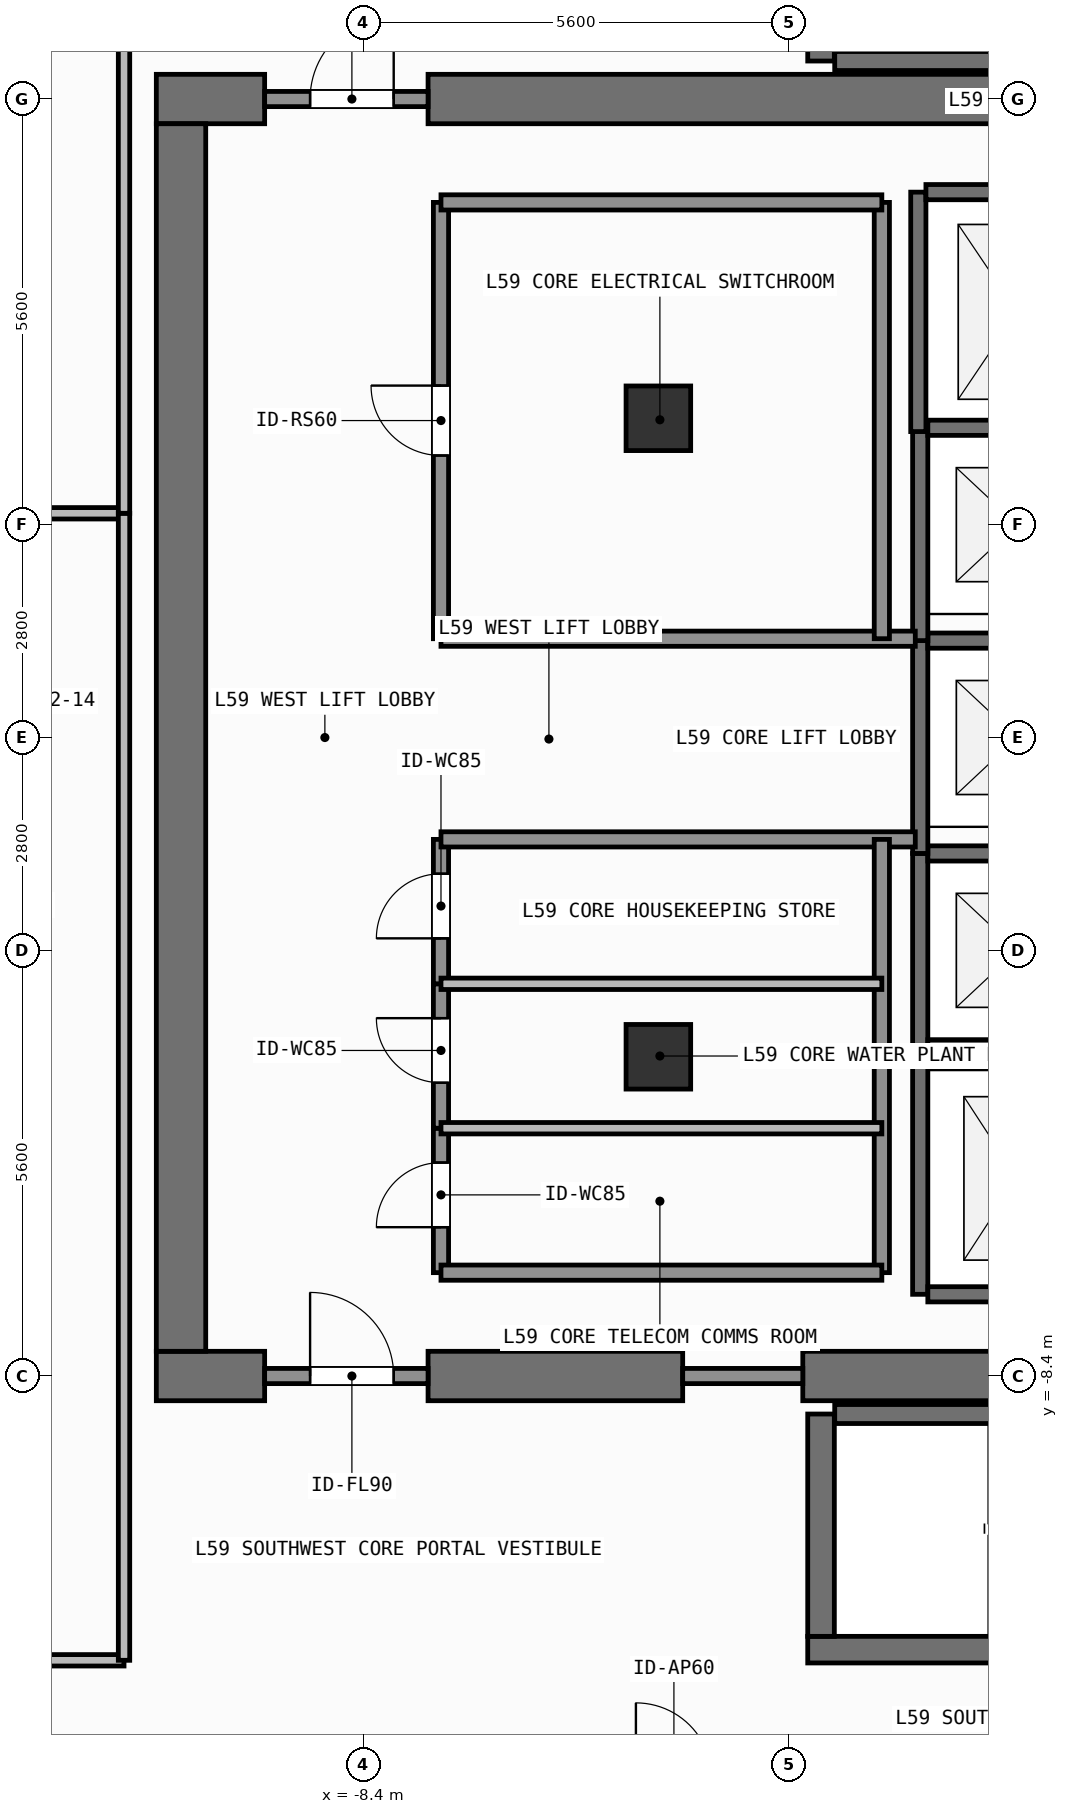
"""IFC4 building model, lengths in metres.
Left out: names, types, materials, properties, quantities, classifications, styles, units other than length and angle.
Written with IfcOpenShell. Run it as: python <this file> out.ifc"""

import sys

from ifc_helpers import new_model, si_unit, direction, frame, frame_2d, origin, origin_2d, place, context, subcontext, project, spatial, rectangle, extrude, element, fill, save


model = new_model("IFC4")
c1 = context("Model", 3, precision=1e-05, world=origin(), true_north=direction((0.0, 1.0)))
c2 = subcontext(c1, "Body", "Model", "MODEL_VIEW")
j1 = project(units=[si_unit("LENGTHUNIT", "METRE"), si_unit("PLANEANGLEUNIT", "RADIAN")], contexts=[c1])
p1 = place(None, origin())
s1 = spatial("IfcSite", under=j1, at=p1, CompositionType="ELEMENT")
p2 = place(p1, origin())
s2 = spatial("IfcBuilding", under=s1, at=p2, CompositionType="ELEMENT")
p3 = place(p2, frame((0.0, 0.0, 243.0)))
s3 = spatial("IfcBuildingStorey", under=s2, at=p3, CompositionType="ELEMENT", Elevation=243.0)
p4 = place(p3, frame((-11.125, -8.4, 0.0), z_axis=(0.0, 0.0, 1.0), x_axis=(1.0, 0.0, 0.0)))
e1 = element("IfcWall", 1, at=p4, inside=s3, PredefinedType="SHEAR", context=c2, shape_type="SweptSolid", body=[
    extrude(rectangle(XDim=1.425, YDim=0.65, at=frame_2d((0.712, 0.0))), origin(), (0.0, 0.0, 1.0), 3.9),
])
p5 = place(p3, frame((-7.55, -8.4, 0.0), z_axis=(0.0, 0.0, 1.0), x_axis=(1.0, 0.0, 0.0)))
e2 = element("IfcWall", 2, at=p5, inside=s3, PredefinedType="SHEAR", context=c2, shape_type="SweptSolid", body=[
    extrude(rectangle(XDim=3.35, YDim=0.65, at=frame_2d((1.675, 0.0))), origin(), (0.0, 0.0, 1.0), 3.9),
])
p6 = place(p3, frame((-2.62, -8.4, 0.0), z_axis=(0.0, 0.0, 1.0), x_axis=(1.0, 0.0, 0.0)))
e3 = element("IfcWall", 3, at=p6, inside=s3, PredefinedType="SHEAR", context=c2, shape_type="SweptSolid", body=[
    extrude(rectangle(XDim=7.27, YDim=0.65, at=frame_2d((3.635, 0.0))), origin(), (0.0, 0.0, 1.0), 3.9),
])
p7 = place(p3, frame((-11.125, 8.4, 0.0), z_axis=(0.0, 0.0, 1.0), x_axis=(1.0, 0.0, 0.0)))
e4 = element("IfcWall", 4, at=p7, inside=s3, PredefinedType="SHEAR", context=c2, shape_type="SweptSolid", body=[
    extrude(rectangle(XDim=1.425, YDim=0.65, at=frame_2d((0.712, 0.0))), origin(), (0.0, 0.0, 1.0), 3.9),
])
p8 = place(p3, frame((-7.55, 8.4, 0.0), z_axis=(0.0, 0.0, 1.0), x_axis=(1.0, 0.0, 0.0)))
e5 = element("IfcWall", 5, at=p8, inside=s3, PredefinedType="SHEAR", context=c2, shape_type="SweptSolid", body=[
    extrude(rectangle(XDim=16.275, YDim=0.65, at=frame_2d((8.138, 0.0))), origin(), (0.0, 0.0, 1.0), 3.9),
])
p9 = place(p3, frame((-10.8, -8.075, 0.0), z_axis=(0.0, 0.0, 1.0), x_axis=(0.0, 1.0, 0.0)))
e6 = element("IfcWall", 6, at=p9, inside=s3, PredefinedType="SHEAR", context=c2, shape_type="SweptSolid", body=[
    extrude(rectangle(XDim=16.15, YDim=0.65, at=frame_2d((8.075, 0.0))), origin(), (0.0, 0.0, 1.0), 3.9),
])
p10 = place(p3, frame((-2.555, -12.0, 0.0), z_axis=(0.0, 0.0, 1.0), x_axis=(1.0, 0.0, 0.0)))
e7 = element("IfcWall", 7, at=p10, inside=s3, PredefinedType="SHEAR", context=c2, shape_type="SweptSolid", body=[
    extrude(rectangle(XDim=7.31, YDim=0.35, at=frame_2d((3.655, 0.0))), origin(), (0.0, 0.0, 1.0), 3.9),
])
p11 = place(p3, frame((-2.2, -8.9, 0.0), z_axis=(0.0, 0.0, 1.0), x_axis=(1.0, 0.0, 0.0)))
e8 = element("IfcWall", 8, at=p11, inside=s3, PredefinedType="SHEAR", context=c2, shape_type="SweptSolid", body=[
    extrude(rectangle(XDim=6.6, YDim=0.25, at=frame_2d((3.3, 0.0))), origin(), (0.0, 0.0, 1.0), 3.9),
])
p12 = place(p3, frame((-2.38, -11.825, 0.0), z_axis=(0.0, 0.0, 1.0), x_axis=(0.0, 1.0, 0.0)))
e9 = element("IfcWall", 9, at=p12, inside=s3, PredefinedType="SHEAR", context=c2, shape_type="SweptSolid", body=[
    extrude(rectangle(XDim=2.925, YDim=0.35, at=frame_2d((1.462, 0.0))), origin(), (0.0, 0.0, 1.0), 3.9),
])
p13 = place(p3, frame((-2.2, 8.9, 0.0), z_axis=(0.0, 0.0, 1.0), x_axis=(1.0, 0.0, 0.0)))
e10 = element("IfcWall", 10, at=p13, inside=s3, PredefinedType="SHEAR", context=c2, shape_type="SweptSolid", body=[
    extrude(rectangle(XDim=6.6, YDim=0.25, at=frame_2d((3.3, 0.0))), origin(), (0.0, 0.0, 1.0), 3.9),
])
p14 = place(p3, frame((-2.38, 8.9, 0.0), z_axis=(0.0, 0.0, 1.0), x_axis=(0.0, 1.0, 0.0)))
e11 = element("IfcWall", 11, at=p14, inside=s3, PredefinedType="SHEAR", context=c2, shape_type="SweptSolid", body=[
    extrude(rectangle(XDim=2.925, YDim=0.35, at=frame_2d((1.462, 0.0))), origin(), (0.0, 0.0, 1.0), 3.9),
])
for number, where, z_axis, x_axis in (
    (12, (-4.52, -4.2, 0.0), (0.0, 0.0, 1.0), (1.0, 0.0, 0.0)),
    (13, (-4.52, 4.2, 0.0), (0.0, 0.0, 1.0), (1.0, 0.0, 0.0)),
):
    element("IfcColumn", number, at=place(p3, frame(where, z_axis=z_axis, x_axis=x_axis)), inside=s3, PredefinedType="COLUMN", context=c2, shape_type="SweptSolid", body=[
        extrude(rectangle(XDim=0.85, YDim=0.85, at=origin_2d()), origin(), (0.0, 0.0, 1.0), 3.9),
    ])
p15 = place(p3, frame((-1.075, -4.275, 0.0), z_axis=(0.0, 0.0, 1.0), x_axis=(0.0, 1.0, 0.0)))
e14 = element("IfcWall", 14, at=p15, inside=s3, PredefinedType="SHEAR", context=c2, shape_type="SweptSolid", body=[
    extrude(rectangle(XDim=2.75, YDim=0.2, at=frame_2d((1.375, 0.0))), origin(), (0.0, 0.0, 1.0), 3.68),
])
for number, where, z_axis, x_axis in (
    (15, (-0.975, -4.075, 0.0), (0.0, 0.0, 1.0), (1.0, 0.0, 0.0)),
    (16, (-0.975, -1.525, 0.0), (0.0, 0.0, 1.0), (1.0, 0.0, 0.0)),
):
    element("IfcWall", number, at=place(p3, frame(where, z_axis=z_axis, x_axis=x_axis)), inside=s3, PredefinedType="SHEAR", context=c2, shape_type="SweptSolid", body=[
        extrude(rectangle(XDim=2.35, YDim=0.2, at=frame_2d((1.175, 0.0))), origin(), (0.0, 0.0, 1.0), 3.68),
    ])
p16 = place(p3, frame((-1.075, -1.525, 0.0), z_axis=(0.0, 0.0, 1.0), x_axis=(0.0, 1.0, 0.0)))
e17 = element("IfcWall", 17, at=p16, inside=s3, PredefinedType="SHEAR", context=c2, shape_type="SweptSolid", body=[
    extrude(rectangle(XDim=2.8, YDim=0.2, at=frame_2d((1.4, 0.0))), origin(), (0.0, 0.0, 1.0), 3.68),
])
p17 = place(p3, frame((-0.975, 1.275, 0.0), z_axis=(0.0, 0.0, 1.0), x_axis=(1.0, 0.0, 0.0)))
e18 = element("IfcWall", 18, at=p17, inside=s3, PredefinedType="SHEAR", context=c2, shape_type="SweptSolid", body=[
    extrude(rectangle(XDim=2.35, YDim=0.2, at=frame_2d((1.175, 0.0))), origin(), (0.0, 0.0, 1.0), 3.68),
])
p18 = place(p3, frame((-1.075, 1.275, 0.0), z_axis=(0.0, 0.0, 1.0), x_axis=(0.0, 1.0, 0.0)))
e19 = element("IfcWall", 19, at=p18, inside=s3, PredefinedType="SHEAR", context=c2, shape_type="SweptSolid", body=[
    extrude(rectangle(XDim=2.8, YDim=0.2, at=frame_2d((1.4, 0.0))), origin(), (0.0, 0.0, 1.0), 3.68),
])
p19 = place(p3, frame((-0.975, 4.075, 0.0), z_axis=(0.0, 0.0, 1.0), x_axis=(1.0, 0.0, 0.0)))
e20 = element("IfcWall", 20, at=p19, inside=s3, PredefinedType="SHEAR", context=c2, shape_type="SweptSolid", body=[
    extrude(rectangle(XDim=2.35, YDim=0.2, at=frame_2d((1.175, 0.0))), origin(), (0.0, 0.0, 1.0), 3.68),
])
p20 = place(p3, frame((-1.1, 4.025, 0.0), z_axis=(0.0, 0.0, 1.0), x_axis=(0.0, 1.0, 0.0)))
e21 = element("IfcWall", 21, at=p20, inside=s3, PredefinedType="SHEAR", context=c2, shape_type="SweptSolid", body=[
    extrude(rectangle(XDim=3.15, YDim=0.2, at=frame_2d((1.575, 0.0))), origin(), (0.0, 0.0, 1.0), 3.68),
])
p21 = place(p3, frame((-1.0, 7.175, 0.0), z_axis=(0.0, 0.0, 1.0), x_axis=(1.0, 0.0, 0.0)))
e22 = element("IfcWall", 22, at=p21, inside=s3, PredefinedType="SHEAR", context=c2, shape_type="SweptSolid", body=[
    extrude(rectangle(XDim=2.4, YDim=0.2, at=frame_2d((1.2, 0.0))), origin(), (0.0, 0.0, 1.0), 3.68),
])
p22 = place(p3, frame((-1.075, -7.325, 0.0), z_axis=(0.0, 0.0, 1.0), x_axis=(0.0, 1.0, 0.0)))
e23 = element("IfcWall", 23, at=p22, inside=s3, PredefinedType="SHEAR", context=c2, shape_type="SweptSolid", body=[
    extrude(rectangle(XDim=3.05, YDim=0.2, at=frame_2d((1.525, 0.0))), origin(), (0.0, 0.0, 1.0), 3.68),
])
p23 = place(p3, frame((-0.975, -7.325, 0.0), z_axis=(0.0, 0.0, 1.0), x_axis=(1.0, 0.0, 0.0)))
e24 = element("IfcWall", 24, at=p23, inside=s3, PredefinedType="SHEAR", context=c2, shape_type="SweptSolid", body=[
    extrude(rectangle(XDim=2.35, YDim=0.2, at=frame_2d((1.175, 0.0))), origin(), (0.0, 0.0, 1.0), 3.68),
])
p24 = place(p3, frame((-9.7, -8.4, 0.0), z_axis=(0.0, 0.0, 1.0), x_axis=(1.0, 0.0, 0.0)))
e25 = element("IfcWall", 25, at=p24, inside=s3, PredefinedType="SOLIDWALL", context=c2, shape_type="SweptSolid", body=[
    extrude(rectangle(XDim=2.15, YDim=0.2, at=frame_2d((1.075, 0.0))), origin(), (0.0, 0.0, 1.0), 2.92),
])
p25 = place(p24, frame((0.598, 0.0, 0.0)))
e26 = element("IfcOpeningElement", 26, at=p25, cuts=e25, PredefinedType="OPENING", context=c2, shape_type="SweptSolid", body=[
    extrude(rectangle(XDim=1.1, YDim=2.15, at=frame_2d((0.55, 1.075))), frame((0.0, 0.11, 0.0), z_axis=(0.0, -1.0, 0.0), x_axis=(1.0, 0.0, 0.0)), (0.0, 0.0, 1.0), 0.22),
])
p26 = place(p3, frame((-9.7, 8.4, 0.0), z_axis=(0.0, 0.0, 1.0), x_axis=(1.0, 0.0, 0.0)))
e27 = element("IfcWall", 27, at=p26, inside=s3, PredefinedType="SOLIDWALL", context=c2, shape_type="SweptSolid", body=[
    extrude(rectangle(XDim=2.15, YDim=0.2, at=frame_2d((1.075, 0.0))), origin(), (0.0, 0.0, 1.0), 2.92),
])
p27 = place(p26, frame((0.598, 0.0, 0.0)))
e28 = element("IfcOpeningElement", 28, at=p27, cuts=e27, PredefinedType="OPENING", context=c2, shape_type="SweptSolid", body=[
    extrude(rectangle(XDim=1.1, YDim=2.15, at=frame_2d((0.55, 1.075))), frame((0.0, 0.11, 0.0), z_axis=(0.0, -1.0, 0.0), x_axis=(1.0, 0.0, 0.0)), (0.0, 0.0, 1.0), 0.22),
])
p28 = place(p3, frame((-7.38, -7.04, 0.0), z_axis=(0.0, 0.0, 1.0), x_axis=(0.0, 1.0, 0.0)))
e29 = element("IfcWall", 29, at=p28, inside=s3, PredefinedType="SOLIDWALL", context=c2, shape_type="SweptSolid", body=[
    extrude(rectangle(XDim=1.9, YDim=0.2, at=frame_2d((0.95, 0.0))), origin(), (0.0, 0.0, 1.0), 3.68),
])
p29 = place(p28, frame((0.598, 0.0, 0.0)))
e30 = element("IfcOpeningElement", 30, at=p29, cuts=e29, PredefinedType="OPENING", context=c2, shape_type="SweptSolid", body=[
    extrude(rectangle(XDim=0.85, YDim=2.1, at=frame_2d((0.425, 1.05))), frame((0.0, 0.11, 0.0), z_axis=(0.0, -1.0, 0.0), x_axis=(1.0, 0.0, 0.0)), (0.0, 0.0, 1.0), 0.22),
])
p30 = place(p3, frame((-7.38, -5.14, 0.0), z_axis=(0.0, 0.0, 1.0), x_axis=(0.0, 1.0, 0.0)))
e31 = element("IfcWall", 31, at=p30, inside=s3, PredefinedType="SOLIDWALL", context=c2, shape_type="SweptSolid", body=[
    extrude(rectangle(XDim=1.9, YDim=0.2, at=frame_2d((0.95, 0.0))), origin(), (0.0, 0.0, 1.0), 3.68),
])
p31 = place(p30, frame((0.598, 0.0, 0.0)))
e32 = element("IfcOpeningElement", 32, at=p31, cuts=e31, PredefinedType="OPENING", context=c2, shape_type="SweptSolid", body=[
    extrude(rectangle(XDim=0.85, YDim=2.1, at=frame_2d((0.425, 1.05))), frame((0.0, 0.11, 0.0), z_axis=(0.0, -1.0, 0.0), x_axis=(1.0, 0.0, 0.0)), (0.0, 0.0, 1.0), 0.22),
])
p32 = place(p3, frame((-7.38, -3.24, 0.0), z_axis=(0.0, 0.0, 1.0), x_axis=(0.0, 1.0, 0.0)))
e33 = element("IfcWall", 33, at=p32, inside=s3, PredefinedType="SOLIDWALL", context=c2, shape_type="SweptSolid", body=[
    extrude(rectangle(XDim=1.9, YDim=0.2, at=frame_2d((0.95, 0.0))), origin(), (0.0, 0.0, 1.0), 3.68),
])
p33 = place(p32, frame((0.598, 0.0, 0.0)))
e34 = element("IfcOpeningElement", 34, at=p33, cuts=e33, PredefinedType="OPENING", context=c2, shape_type="SweptSolid", body=[
    extrude(rectangle(XDim=0.85, YDim=2.1, at=frame_2d((0.425, 1.05))), frame((0.0, 0.11, 0.0), z_axis=(0.0, -1.0, 0.0), x_axis=(1.0, 0.0, 0.0)), (0.0, 0.0, 1.0), 0.22),
])
p34 = place(p3, frame((-7.38, 1.3, 0.0), z_axis=(0.0, 0.0, 1.0), x_axis=(0.0, 1.0, 0.0)))
e35 = element("IfcWall", 35, at=p34, inside=s3, PredefinedType="SOLIDWALL", context=c2, shape_type="SweptSolid", body=[
    extrude(rectangle(XDim=5.74, YDim=0.2, at=frame_2d((2.87, 0.0))), origin(), (0.0, 0.0, 1.0), 3.68),
])
p35 = place(p34, frame((2.41, 0.0, 0.0)))
e36 = element("IfcOpeningElement", 36, at=p35, cuts=e35, PredefinedType="OPENING", context=c2, shape_type="SweptSolid", body=[
    extrude(rectangle(XDim=0.92, YDim=2.1, at=frame_2d((0.46, 1.05))), frame((0.0, 0.11, 0.0), z_axis=(0.0, -1.0, 0.0), x_axis=(1.0, 0.0, 0.0)), (0.0, 0.0, 1.0), 0.22),
])
p36 = place(p3, frame((-18.33, -12.14, 0.0), z_axis=(0.0, 0.0, 1.0), x_axis=(1.0, 0.0, 0.0)))
e37 = element("IfcWall", 37, at=p36, inside=s3, PredefinedType="PARTITIONING", context=c2, shape_type="SweptSolid", body=[
    extrude(rectangle(XDim=6.78, YDim=0.15, at=frame_2d((3.39, 0.0))), origin(), (0.0, 0.0, 1.0), 3.68),
])
p37 = place(p36, frame((2.85, 0.0, 0.0)))
e38 = element("IfcOpeningElement", 38, at=p37, cuts=e37, PredefinedType="OPENING", context=c2, shape_type="SweptSolid", body=[
    extrude(rectangle(XDim=0.9, YDim=2.1, at=frame_2d((0.45, 1.05))), frame((0.0, 0.085, 0.0), z_axis=(0.0, -1.0, 0.0), x_axis=(1.0, 0.0, 0.0)), (0.0, 0.0, 1.0), 0.17),
])
p38 = place(p3, frame((-4.2, -8.4, 0.0), z_axis=(0.0, 0.0, 1.0), x_axis=(1.0, 0.0, 0.0)))
e39 = element("IfcWall", 39, at=p38, inside=s3, PredefinedType="SOLIDWALL", context=c2, shape_type="SweptSolid", body=[
    extrude(rectangle(XDim=1.58, YDim=0.2, at=frame_2d((0.79, 0.0))), origin(), (0.0, 0.0, 1.0), 2.92),
])
for number, where, z_axis, x_axis in (
    (40, (-7.38, -1.34, 0.0), (0.0, 0.0, 1.0), (1.0, 0.0, 0.0)),
    (41, (-7.38, 1.3, 0.0), (0.0, 0.0, 1.0), (1.0, 0.0, 0.0)),
):
    element("IfcWall", number, at=place(p3, frame(where, z_axis=z_axis, x_axis=x_axis)), inside=s3, PredefinedType="SOLIDWALL", context=c2, shape_type="SweptSolid", body=[
        extrude(rectangle(XDim=6.24, YDim=0.2, at=frame_2d((3.12, 0.0))), origin(), (0.0, 0.0, 1.0), 3.68),
    ])
p39 = place(p3, frame((-1.58, -7.04, 0.0), z_axis=(0.0, 0.0, 1.0), x_axis=(0.0, 1.0, 0.0)))
e42 = element("IfcWall", 42, at=p39, inside=s3, PredefinedType="SOLIDWALL", context=c2, shape_type="SweptSolid", body=[
    extrude(rectangle(XDim=5.7, YDim=0.2, at=frame_2d((2.85, 0.0))), origin(), (0.0, 0.0, 1.0), 3.68),
])
p40 = place(p3, frame((-7.38, -7.04, 0.0), z_axis=(0.0, 0.0, 1.0), x_axis=(1.0, 0.0, 0.0)))
e43 = element("IfcWall", 43, at=p40, inside=s3, PredefinedType="SOLIDWALL", context=c2, shape_type="SweptSolid", body=[
    extrude(rectangle(XDim=5.8, YDim=0.2, at=frame_2d((2.9, 0.0))), origin(), (0.0, 0.0, 1.0), 3.68),
])
p41 = place(p3, frame((-1.58, 1.3, 0.0), z_axis=(0.0, 0.0, 1.0), x_axis=(0.0, 1.0, 0.0)))
e44 = element("IfcWall", 44, at=p41, inside=s3, PredefinedType="SOLIDWALL", context=c2, shape_type="SweptSolid", body=[
    extrude(rectangle(XDim=5.74, YDim=0.2, at=frame_2d((2.87, 0.0))), origin(), (0.0, 0.0, 1.0), 3.68),
])
p42 = place(p3, frame((-7.38, 7.04, 0.0), z_axis=(0.0, 0.0, 1.0), x_axis=(1.0, 0.0, 0.0)))
e45 = element("IfcWall", 45, at=p42, inside=s3, PredefinedType="SOLIDWALL", context=c2, shape_type="SweptSolid", body=[
    extrude(rectangle(XDim=5.8, YDim=0.2, at=frame_2d((2.9, 0.0))), origin(), (0.0, 0.0, 1.0), 3.68),
])
for number, where, z_axis, x_axis in (
    (46, (-7.38, -5.14, 0.0), (0.0, 0.0, 1.0), (1.0, 0.0, 0.0)),
    (47, (-7.38, -3.24, 0.0), (0.0, 0.0, 1.0), (1.0, 0.0, 0.0)),
):
    element("IfcWall", number, at=place(p3, frame(where, z_axis=z_axis, x_axis=x_axis)), inside=s3, PredefinedType="PARTITIONING", context=c2, shape_type="SweptSolid", body=[
        extrude(rectangle(XDim=5.8, YDim=0.15, at=frame_2d((2.9, 0.0))), origin(), (0.0, 0.0, 1.0), 3.68),
    ])
p43 = place(p3, frame((-18.33, 2.95, 0.0), z_axis=(0.0, 0.0, 1.0), x_axis=(1.0, 0.0, 0.0)))
e48 = element("IfcWall", 48, at=p43, inside=s3, PredefinedType="PARTITIONING", context=c2, shape_type="SweptSolid", body=[
    extrude(rectangle(XDim=6.78, YDim=0.15, at=frame_2d((3.39, 0.0))), origin(), (0.0, 0.0, 1.0), 3.68),
])
p44 = place(p3, frame((-11.55, -12.14, 0.0), z_axis=(0.0, 0.0, 1.0), x_axis=(0.0, 1.0, 0.0)))
e49 = element("IfcWall", 49, at=p44, inside=s3, PredefinedType="PARTITIONING", context=c2, shape_type="SweptSolid", body=[
    extrude(rectangle(XDim=15.09, YDim=0.15, at=frame_2d((7.545, 0.0))), origin(), (0.0, 0.0, 1.0), 3.68),
])
p45 = place(p3, frame((-11.55, 2.95, 0.0), z_axis=(0.0, 0.0, 1.0), x_axis=(0.0, 1.0, 0.0)))
e50 = element("IfcWall", 50, at=p45, inside=s3, PredefinedType="PARTITIONING", context=c2, shape_type="SweptSolid", body=[
    extrude(rectangle(XDim=9.19, YDim=0.15, at=frame_2d((4.595, 0.0))), origin(), (0.0, 0.0, 1.0), 3.68),
])
p46 = place(p25, origin())
e51 = element("IfcDoor", 51, at=p46, inside=s3, OperationType="SINGLE_SWING_LEFT", PredefinedType="DOOR", context=c2, shape_type="SweptSolid", body=[
    extrude(rectangle(XDim=1.1, YDim=2.15, at=frame_2d((0.55, 1.075))), frame((0.0, 0.025, 0.0), z_axis=(0.0, -1.0, 0.0), x_axis=(1.0, 0.0, 0.0)), (0.0, 0.0, 1.0), 0.05),
])
fill(e26, e51)
p47 = place(p27, origin())
e52 = element("IfcDoor", 52, at=p47, inside=s3, OperationType="SINGLE_SWING_RIGHT", PredefinedType="DOOR", context=c2, shape_type="SweptSolid", body=[
    extrude(rectangle(XDim=1.1, YDim=2.15, at=frame_2d((0.55, 1.075))), frame((0.0, 0.025, 0.0), z_axis=(0.0, -1.0, 0.0), x_axis=(1.0, 0.0, 0.0)), (0.0, 0.0, 1.0), 0.05),
])
fill(e28, e52)
p48 = place(p29, origin())
e53 = element("IfcDoor", 53, at=p48, inside=s3, OperationType="SINGLE_SWING_LEFT", PredefinedType="DOOR", context=c2, shape_type="SweptSolid", body=[
    extrude(rectangle(XDim=0.85, YDim=2.1, at=frame_2d((0.425, 1.05))), frame((0.0, 0.025, 0.0), z_axis=(0.0, -1.0, 0.0), x_axis=(1.0, 0.0, 0.0)), (0.0, 0.0, 1.0), 0.05),
])
fill(e30, e53)
p49 = place(p31, origin())
e54 = element("IfcDoor", 54, at=p49, inside=s3, OperationType="SINGLE_SWING_RIGHT", PredefinedType="DOOR", context=c2, shape_type="SweptSolid", body=[
    extrude(rectangle(XDim=0.85, YDim=2.1, at=frame_2d((0.425, 1.05))), frame((0.0, 0.025, 0.0), z_axis=(0.0, -1.0, 0.0), x_axis=(1.0, 0.0, 0.0)), (0.0, 0.0, 1.0), 0.05),
])
fill(e32, e54)
p50 = place(p33, origin())
e55 = element("IfcDoor", 55, at=p50, inside=s3, OperationType="SINGLE_SWING_LEFT", PredefinedType="DOOR", context=c2, shape_type="SweptSolid", body=[
    extrude(rectangle(XDim=0.85, YDim=2.1, at=frame_2d((0.425, 1.05))), frame((0.0, 0.025, 0.0), z_axis=(0.0, -1.0, 0.0), x_axis=(1.0, 0.0, 0.0)), (0.0, 0.0, 1.0), 0.05),
])
fill(e34, e55)
p51 = place(p35, origin())
e56 = element("IfcDoor", 56, at=p51, inside=s3, OperationType="SINGLE_SWING_RIGHT", PredefinedType="DOOR", context=c2, shape_type="SweptSolid", body=[
    extrude(rectangle(XDim=0.92, YDim=2.1, at=frame_2d((0.46, 1.05))), frame((0.0, 0.025, 0.0), z_axis=(0.0, -1.0, 0.0), x_axis=(1.0, 0.0, 0.0)), (0.0, 0.0, 1.0), 0.05),
])
fill(e36, e56)
save(model, sys.argv[1])
